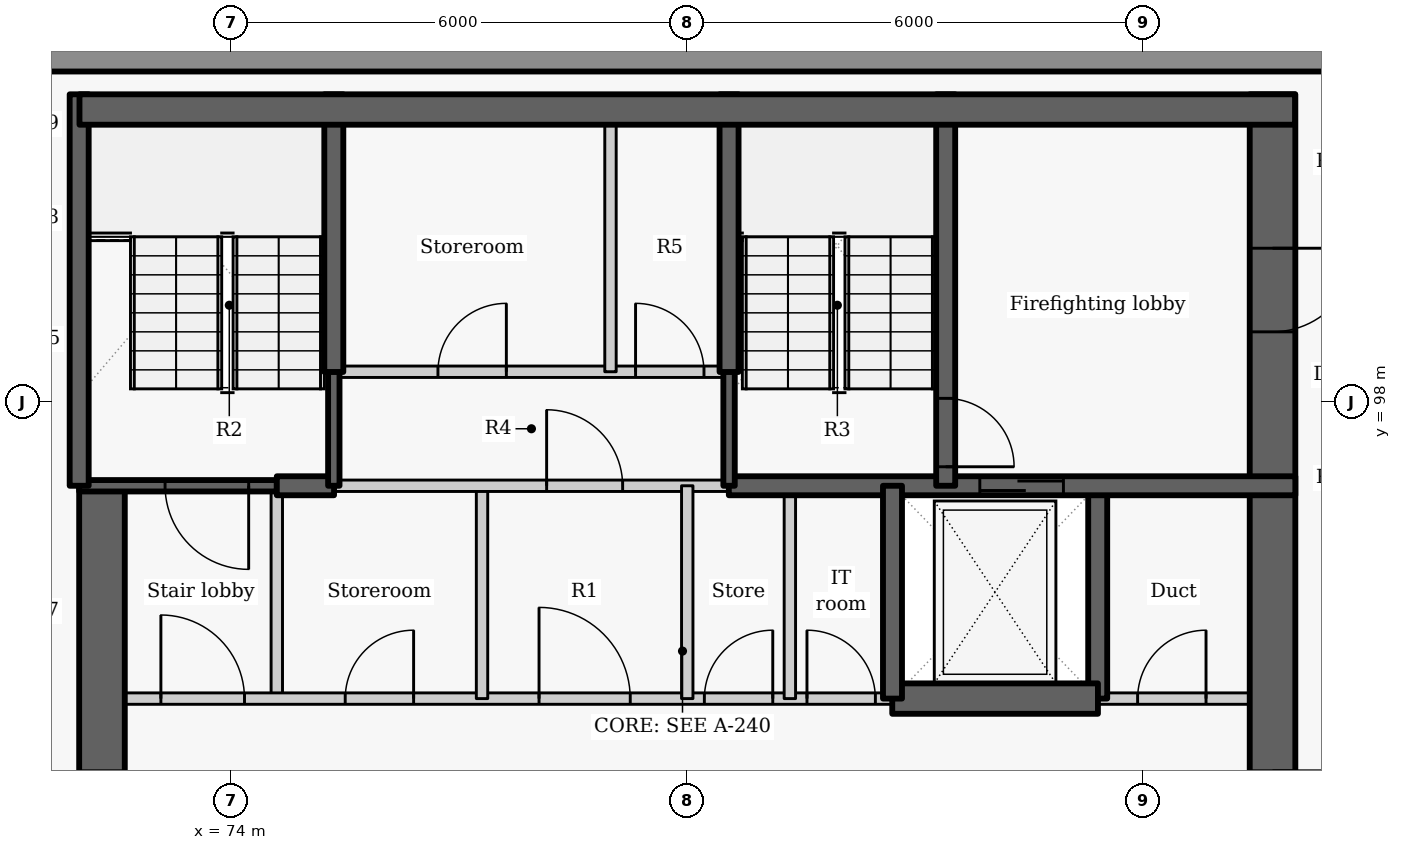
"""IFC4 building model, lengths in metres.
Left out: names, types, materials, properties, quantities, classifications, styles, units other than length and angle.
Written with IfcOpenShell. Run it as: python <this file> out.ifc"""

import sys

from ifc_helpers import new_model, si_unit, direction, frame, frame_2d, origin, place, context, subcontext, project, spatial, rectangle, extrude, element, fill, save


model = new_model("IFC4")
c1 = context("Model", 3, precision=1e-05, world=origin(), true_north=direction((0.0, 1.0)))
c2 = subcontext(c1, "Body", "Model", "MODEL_VIEW")
j1 = project(units=[si_unit("LENGTHUNIT", "METRE"), si_unit("PLANEANGLEUNIT", "RADIAN")], contexts=[c1])
p1 = place(None, origin())
s1 = spatial("IfcSite", under=j1, at=p1, CompositionType="ELEMENT")
p2 = place(p1, origin())
s2 = spatial("IfcBuilding", under=s1, at=p2, CompositionType="ELEMENT")
p3 = place(p2, frame((0.0, 0.0, 229.5)))
s3 = spatial("IfcBuildingStorey", under=s2, at=p3, CompositionType="ELEMENT", Elevation=229.5)
p4 = place(p3, frame((89.499, 102.5, 0.0), z_axis=(0.0, 0.0, 1.0), x_axis=(-1.0, 0.0, 0.0)))
e1 = element("IfcWall", 1, at=p4, inside=s3, PredefinedType="SOLIDWALL", context=c2, shape_type="SweptSolid", body=[
    extrude(rectangle(XDim=19.033, YDim=0.3, at=frame_2d((9.517, 0.0))), origin(), (0.0, 0.0, 1.0), 2.425),
])
p5 = place(p3, frame((74.6, 94.1, 0.0), z_axis=(0.0, 0.0, 1.0), x_axis=(0.0, 1.0, 0.0)))
e2 = element("IfcWall", 2, at=p5, inside=s3, PredefinedType="PARTITIONING", context=c2, shape_type="SweptSolid", body=[
    extrude(rectangle(XDim=2.8, YDim=0.15, at=frame_2d((1.4, 0.0))), origin(), (0.0, 0.0, 1.0), 3.025),
])
p6 = place(p3, frame((72.3, 87.8, -0.275), z_axis=(0.0, 0.0, 1.0), x_axis=(0.0, 1.0, 0.0)))
e3 = element("IfcWall", 3, at=p6, inside=s3, PredefinedType="SHEAR", context=c2, shape_type="SweptSolid", body=[
    extrude(rectangle(XDim=9.1, YDim=0.6, at=frame_2d((4.55, 0.0))), origin(), (0.0, 0.0, 1.0), 3.3),
])
p7 = place(p6, frame((3.85, 0.0, 0.275)))
e4 = element("IfcOpeningElement", 4, at=p7, cuts=e3, PredefinedType="OPENING", context=c2, shape_type="SweptSolid", body=[
    extrude(rectangle(XDim=1.5, YDim=2.1, at=frame_2d((0.75, 1.05))), frame((0.0, 0.31, 0.0), z_axis=(0.0, -1.0, 0.0), x_axis=(1.0, 0.0, 0.0)), (0.0, 0.0, 1.0), 0.62),
])
p8 = place(p3, frame((85.4, 94.1, -0.275), z_axis=(0.0, 0.0, 1.0), x_axis=(0.0, 1.0, 0.0)))
e5 = element("IfcWall", 5, at=p8, inside=s3, PredefinedType="SHEAR", context=c2, shape_type="SweptSolid", body=[
    extrude(rectangle(XDim=2.8, YDim=0.25, at=frame_2d((1.4, 0.0))), origin(), (0.0, 0.0, 1.0), 3.3),
])
p9 = place(p3, frame((87.7, 102.05, -0.275), z_axis=(0.0, 0.0, 1.0), x_axis=(0.0, -1.0, 0.0)))
e6 = element("IfcWall", 6, at=p9, inside=s3, PredefinedType="SHEAR", context=c2, shape_type="SweptSolid", body=[
    extrude(rectangle(XDim=14.25, YDim=0.6, at=frame_2d((7.125, 0.0))), origin(), (0.0, 0.0, 1.0), 3.3),
])
p10 = place(p9, frame((8.9, 0.0, 0.275)))
e7 = element("IfcOpeningElement", 7, at=p10, cuts=e6, PredefinedType="OPENING", context=c2, shape_type="SweptSolid", body=[
    extrude(rectangle(XDim=1.5, YDim=2.1, at=frame_2d((0.75, 1.05))), frame((0.0, 0.31, 0.0), z_axis=(0.0, -1.0, 0.0), x_axis=(1.0, 0.0, 0.0)), (0.0, 0.0, 1.0), 0.62),
])
p11 = place(p9, frame((2.025, 0.0, 0.275)))
e8 = element("IfcOpeningElement", 8, at=p11, cuts=e6, PredefinedType="OPENING", context=c2, shape_type="SweptSolid", body=[
    extrude(rectangle(XDim=1.1, YDim=2.1, at=frame_2d((0.55, 1.05))), frame((0.0, 0.31, 0.0), z_axis=(0.0, -1.0, 0.0), x_axis=(1.0, 0.0, 0.0)), (0.0, 0.0, 1.0), 0.62),
])
p12 = place(p3, frame((72.0, 94.1, 0.0), z_axis=(0.0, 0.0, 1.0), x_axis=(1.0, 0.0, 0.0)))
e9 = element("IfcWall", 9, at=p12, inside=s3, PredefinedType="PARTITIONING", context=c2, shape_type="SweptSolid", body=[
    extrude(rectangle(XDim=10.703, YDim=0.15, at=frame_2d((5.352, 0.0))), origin(), (0.0, 0.0, 1.0), 3.025),
])
p13 = place(p12, frame((1.075, 0.0, 0.0)))
e10 = element("IfcOpeningElement", 10, at=p13, cuts=e9, PredefinedType="OPENING", context=c2, shape_type="SweptSolid", body=[
    extrude(rectangle(XDim=1.1, YDim=2.1, at=frame_2d((0.55, 1.05))), frame((0.0, 0.085, 0.0), z_axis=(0.0, -1.0, 0.0), x_axis=(1.0, 0.0, 0.0)), (0.0, 0.0, 1.0), 0.17),
])
p14 = place(p12, frame((3.5, 0.0, 0.0)))
e11 = element("IfcOpeningElement", 11, at=p14, cuts=e9, PredefinedType="OPENING", context=c2, shape_type="SweptSolid", body=[
    extrude(rectangle(XDim=0.9, YDim=2.1, at=frame_2d((0.45, 1.05))), frame((0.0, 0.085, 0.0), z_axis=(0.0, -1.0, 0.0), x_axis=(1.0, 0.0, 0.0)), (0.0, 0.0, 1.0), 0.17),
])
p15 = place(p12, frame((6.05, 0.0, 0.0)))
e12 = element("IfcOpeningElement", 12, at=p15, cuts=e9, PredefinedType="OPENING", context=c2, shape_type="SweptSolid", body=[
    extrude(rectangle(XDim=1.2, YDim=2.1, at=frame_2d((0.6, 1.05))), frame((0.0, 0.085, 0.0), z_axis=(0.0, -1.0, 0.0), x_axis=(1.0, 0.0, 0.0)), (0.0, 0.0, 1.0), 0.17),
])
p16 = place(p12, frame((8.225, 0.0, 0.0)))
e13 = element("IfcOpeningElement", 13, at=p16, cuts=e9, PredefinedType="OPENING", context=c2, shape_type="SweptSolid", body=[
    extrude(rectangle(XDim=0.9, YDim=2.1, at=frame_2d((0.45, 1.05))), frame((0.0, 0.085, 0.0), z_axis=(0.0, -1.0, 0.0), x_axis=(1.0, 0.0, 0.0)), (0.0, 0.0, 1.0), 0.17),
])
p17 = place(p12, frame((9.575, 0.0, 0.0)))
e14 = element("IfcOpeningElement", 14, at=p17, cuts=e9, PredefinedType="OPENING", context=c2, shape_type="SweptSolid", body=[
    extrude(rectangle(XDim=0.9, YDim=2.1, at=frame_2d((0.45, 1.05))), frame((0.0, 0.085, 0.0), z_axis=(0.0, -1.0, 0.0), x_axis=(1.0, 0.0, 0.0)), (0.0, 0.0, 1.0), 0.17),
])
p18 = place(p3, frame((85.397, 94.1, 0.0), z_axis=(0.0, 0.0, 1.0), x_axis=(1.0, 0.0, 0.0)))
e15 = element("IfcWall", 15, at=p18, inside=s3, PredefinedType="PARTITIONING", context=c2, shape_type="SweptSolid", body=[
    extrude(rectangle(XDim=2.603, YDim=0.15, at=frame_2d((1.302, 0.0))), origin(), (0.0, 0.0, 1.0), 3.025),
])
p19 = place(p18, frame((0.528, 0.0, 0.0)))
e16 = element("IfcOpeningElement", 16, at=p19, cuts=e15, PredefinedType="OPENING", context=c2, shape_type="SweptSolid", body=[
    extrude(rectangle(XDim=0.9, YDim=2.1, at=frame_2d((0.45, 1.05))), frame((0.0, 0.085, 0.0), z_axis=(0.0, -1.0, 0.0), x_axis=(1.0, 0.0, 0.0)), (0.0, 0.0, 1.0), 0.17),
])
p20 = place(p3, frame((82.697, 94.1, -0.275), z_axis=(0.0, 0.0, 1.0), x_axis=(1.0, 0.0, 0.0)))
e17 = element("IfcWall", 17, at=p20, inside=s3, PredefinedType="SHEAR", context=c2, shape_type="SweptSolid", body=[
    extrude(rectangle(XDim=2.706, YDim=0.4, at=frame_2d((1.353, 0.0))), origin(), (0.0, 0.0, 1.0), 3.3),
])
p21 = place(p3, frame((74.6, 96.9, -0.275), z_axis=(0.0, 0.0, 1.0), x_axis=(-1.0, 0.0, 0.0)))
e18 = element("IfcWall", 18, at=p21, inside=s3, PredefinedType="SHEAR", context=c2, shape_type="SweptSolid", body=[
    extrude(rectangle(XDim=2.6, YDim=0.15, at=frame_2d((1.3, 0.0))), origin(), (0.0, 0.0, 1.0), 3.3),
])
p22 = place(p21, frame((0.37, 0.0, 0.275)))
e19 = element("IfcOpeningElement", 19, at=p22, cuts=e18, PredefinedType="OPENING", context=c2, shape_type="SweptSolid", body=[
    extrude(rectangle(XDim=1.1, YDim=2.1, at=frame_2d((0.55, 1.05))), frame((0.0, 0.085, 0.0), z_axis=(0.0, -1.0, 0.0), x_axis=(1.0, 0.0, 0.0)), (0.0, 0.0, 1.0), 0.17),
])
p23 = place(p3, frame((77.3, 94.1, 0.0), z_axis=(0.0, 0.0, 1.0), x_axis=(0.0, 1.0, 0.0)))
e20 = element("IfcWall", 20, at=p23, inside=s3, PredefinedType="PARTITIONING", context=c2, shape_type="SweptSolid", body=[
    extrude(rectangle(XDim=2.8, YDim=0.15, at=frame_2d((1.4, 0.0))), origin(), (0.0, 0.0, 1.0), 3.025),
])
p24 = place(p3, frame((74.6, 96.9, -0.275), z_axis=(0.0, 0.0, 1.0), x_axis=(1.0, 0.0, 0.0)))
e21 = element("IfcWall", 21, at=p24, inside=s3, PredefinedType="SHEAR", context=c2, shape_type="SweptSolid", body=[
    extrude(rectangle(XDim=0.753, YDim=0.25, at=frame_2d((0.376, 0.0))), origin(), (0.0, 0.0, 1.0), 3.3),
])
p25 = place(p3, frame((80.547, 96.9, -0.275), z_axis=(0.0, 0.0, 1.0), x_axis=(1.0, 0.0, 0.0)))
e22 = element("IfcWall", 22, at=p25, inside=s3, PredefinedType="SHEAR", context=c2, shape_type="SweptSolid", body=[
    extrude(rectangle(XDim=7.453, YDim=0.25, at=frame_2d((3.727, 0.0))), origin(), (0.0, 0.0, 1.0), 3.3),
])
p26 = place(p25, frame((3.302, 0.0, 0.275)))
e23 = element("IfcOpeningElement", 23, at=p26, cuts=e22, PredefinedType="OPENING", context=c2, shape_type="SweptSolid", body=[
    extrude(rectangle(XDim=1.1, YDim=2.1, at=frame_2d((0.55, 1.05))), frame((0.0, 0.135, 0.0), z_axis=(0.0, -1.0, 0.0), x_axis=(1.0, 0.0, 0.0)), (0.0, 0.0, 1.0), 0.27),
])
p27 = place(p3, frame((75.347, 96.9, 0.0), z_axis=(0.0, 0.0, 1.0), x_axis=(1.0, 0.0, 0.0)))
e24 = element("IfcWall", 24, at=p27, inside=s3, PredefinedType="PARTITIONING", context=c2, shape_type="SweptSolid", body=[
    extrude(rectangle(XDim=5.206, YDim=0.15, at=frame_2d((2.603, 0.0))), origin(), (0.0, 0.0, 1.0), 3.025),
])
p28 = place(p27, frame((2.803, 0.0, 0.0)))
e25 = element("IfcOpeningElement", 25, at=p28, cuts=e24, PredefinedType="OPENING", context=c2, shape_type="SweptSolid", body=[
    extrude(rectangle(XDim=1.0, YDim=2.1, at=frame_2d((0.5, 1.05))), frame((0.0, 0.085, 0.0), z_axis=(0.0, -1.0, 0.0), x_axis=(1.0, 0.0, 0.0)), (0.0, 0.0, 1.0), 0.17),
])
for number, where, z_axis, x_axis in (
    (26, (80.0, 94.1, 0.0), (0.0, 0.0, 1.0), (0.0, 1.0, 0.0)),
    (27, (81.35, 94.1, 0.0), (0.0, 0.0, 1.0), (0.0, 1.0, 0.0)),
):
    element("IfcWall", number, at=place(p3, frame(where, z_axis=z_axis, x_axis=x_axis)), inside=s3, PredefinedType="PARTITIONING", context=c2, shape_type="SweptSolid", body=[
        extrude(rectangle(XDim=2.8, YDim=0.15, at=frame_2d((1.4, 0.0))), origin(), (0.0, 0.0, 1.0), 3.025),
    ])
p29 = place(p3, frame((82.7, 94.1, -0.275), z_axis=(0.0, 0.0, 1.0), x_axis=(0.0, 1.0, 0.0)))
e28 = element("IfcWall", 28, at=p29, inside=s3, PredefinedType="SHEAR", context=c2, shape_type="SweptSolid", body=[
    extrude(rectangle(XDim=2.8, YDim=0.25, at=frame_2d((1.4, 0.0))), origin(), (0.0, 0.0, 1.0), 3.3),
])
p30 = place(p3, frame((75.35, 96.9, -0.275), z_axis=(0.0, 0.0, 1.0), x_axis=(0.0, 1.0, 0.0)))
e29 = element("IfcWall", 29, at=p30, inside=s3, PredefinedType="SHEAR", context=c2, shape_type="SweptSolid", body=[
    extrude(rectangle(XDim=1.503, YDim=0.15, at=frame_2d((0.751, 0.0))), origin(), (0.0, 0.0, 1.0), 3.3),
])
p31 = place(p3, frame((75.35, 98.397, -0.275), z_axis=(0.0, 0.0, 1.0), x_axis=(0.0, 1.0, 0.0)))
e30 = element("IfcWall", 30, at=p31, inside=s3, PredefinedType="SHEAR", context=c2, shape_type="SweptSolid", body=[
    extrude(rectangle(XDim=3.653, YDim=0.25, at=frame_2d((1.827, 0.0))), origin(), (0.0, 0.0, 1.0), 3.3),
])
p32 = place(p3, frame((72.0, 96.9, -0.275), z_axis=(0.0, 0.0, 1.0), x_axis=(0.0, 1.0, 0.0)))
e31 = element("IfcWall", 31, at=p32, inside=s3, PredefinedType="SHEAR", context=c2, shape_type="SweptSolid", body=[
    extrude(rectangle(XDim=5.15, YDim=0.25, at=frame_2d((2.575, 0.0))), origin(), (0.0, 0.0, 1.0), 3.3),
])
p33 = place(p3, frame((83.4, 102.05, -0.275), z_axis=(0.0, 0.0, 1.0), x_axis=(0.0, -1.0, 0.0)))
e32 = element("IfcWall", 32, at=p33, inside=s3, PredefinedType="SHEAR", context=c2, shape_type="SweptSolid", body=[
    extrude(rectangle(XDim=5.15, YDim=0.25, at=frame_2d((2.575, 0.0))), origin(), (0.0, 0.0, 1.0), 3.3),
])
p34 = place(p33, frame((4.0, 0.0, 0.275)))
e33 = element("IfcOpeningElement", 33, at=p34, cuts=e32, PredefinedType="OPENING", context=c2, shape_type="SweptSolid", body=[
    extrude(rectangle(XDim=0.9, YDim=2.1, at=frame_2d((0.45, 1.05))), frame((0.0, 0.135, 0.0), z_axis=(0.0, -1.0, 0.0), x_axis=(1.0, 0.0, 0.0)), (0.0, 0.0, 1.0), 0.27),
])
p35 = place(p3, frame((80.55, 96.9, -0.275), z_axis=(0.0, 0.0, 1.0), x_axis=(0.0, 1.0, 0.0)))
e34 = element("IfcWall", 34, at=p35, inside=s3, PredefinedType="SHEAR", context=c2, shape_type="SweptSolid", body=[
    extrude(rectangle(XDim=1.503, YDim=0.15, at=frame_2d((0.751, 0.0))), origin(), (0.0, 0.0, 1.0), 3.3),
])
p36 = place(p3, frame((80.55, 98.397, -0.275), z_axis=(0.0, 0.0, 1.0), x_axis=(0.0, 1.0, 0.0)))
e35 = element("IfcWall", 35, at=p36, inside=s3, PredefinedType="SHEAR", context=c2, shape_type="SweptSolid", body=[
    extrude(rectangle(XDim=3.653, YDim=0.25, at=frame_2d((1.827, 0.0))), origin(), (0.0, 0.0, 1.0), 3.3),
])
p37 = place(p3, frame((75.35, 98.4, 0.0), z_axis=(0.0, 0.0, 1.0), x_axis=(1.0, 0.0, 0.0)))
e36 = element("IfcWall", 36, at=p37, inside=s3, PredefinedType="PARTITIONING", context=c2, shape_type="SweptSolid", body=[
    extrude(rectangle(XDim=5.2, YDim=0.15, at=frame_2d((2.6, 0.0))), origin(), (0.0, 0.0, 1.0), 3.025),
])
p38 = place(p37, frame((1.37, 0.0, 0.0)))
e37 = element("IfcOpeningElement", 37, at=p38, cuts=e36, PredefinedType="OPENING", context=c2, shape_type="SweptSolid", body=[
    extrude(rectangle(XDim=0.9, YDim=2.1, at=frame_2d((0.45, 1.05))), frame((0.0, 0.085, 0.0), z_axis=(0.0, -1.0, 0.0), x_axis=(1.0, 0.0, 0.0)), (0.0, 0.0, 1.0), 0.17),
])
p39 = place(p37, frame((3.97, 0.0, 0.0)))
e38 = element("IfcOpeningElement", 38, at=p39, cuts=e36, PredefinedType="OPENING", context=c2, shape_type="SweptSolid", body=[
    extrude(rectangle(XDim=0.9, YDim=2.1, at=frame_2d((0.45, 1.05))), frame((0.0, 0.085, 0.0), z_axis=(0.0, -1.0, 0.0), x_axis=(1.0, 0.0, 0.0)), (0.0, 0.0, 1.0), 0.17),
])
p40 = place(p3, frame((78.99, 98.4, 0.0), z_axis=(0.0, 0.0, 1.0), x_axis=(0.0, 1.0, 0.0)))
e39 = element("IfcWall", 39, at=p40, inside=s3, PredefinedType="PARTITIONING", context=c2, shape_type="SweptSolid", body=[
    extrude(rectangle(XDim=3.65, YDim=0.15, at=frame_2d((1.825, 0.0))), origin(), (0.0, 0.0, 1.0), 3.025),
])
p41 = place(p3, frame((72.004, 101.85, -0.275), z_axis=(0.0, 0.0, 1.0), x_axis=(1.0, 0.0, 0.0)))
e40 = element("IfcWall", 40, at=p41, inside=s3, PredefinedType="SHEAR", context=c2, shape_type="SweptSolid", body=[
    extrude(rectangle(XDim=15.992, YDim=0.4, at=frame_2d((7.996, 0.0))), origin(), (0.0, 0.0, 1.0), 3.3),
])
p42 = place(p13, origin())
e41 = element("IfcDoor", 41, at=p42, inside=s3, OperationType="SINGLE_SWING_LEFT", PredefinedType="DOOR", context=c2, shape_type="SweptSolid", body=[
    extrude(rectangle(XDim=1.1, YDim=2.1, at=frame_2d((0.55, 1.05))), frame((0.0, 0.025, 0.0), z_axis=(0.0, -1.0, 0.0), x_axis=(1.0, 0.0, 0.0)), (0.0, 0.0, 1.0), 0.05),
])
fill(e10, e41)
p43 = place(p14, origin())
e42 = element("IfcDoor", 42, at=p43, inside=s3, OperationType="SINGLE_SWING_RIGHT", PredefinedType="DOOR", context=c2, shape_type="SweptSolid", body=[
    extrude(rectangle(XDim=0.9, YDim=2.1, at=frame_2d((0.45, 1.05))), frame((0.0, 0.025, 0.0), z_axis=(0.0, -1.0, 0.0), x_axis=(1.0, 0.0, 0.0)), (0.0, 0.0, 1.0), 0.05),
])
fill(e11, e42)
p44 = place(p15, origin())
e43 = element("IfcDoor", 43, at=p44, inside=s3, OperationType="DOUBLE_DOOR_SINGLE_SWING", PredefinedType="DOOR", context=c2, shape_type="SweptSolid", body=[
    extrude(rectangle(XDim=1.2, YDim=2.1, at=frame_2d((0.6, 1.05))), frame((0.0, 0.025, 0.0), z_axis=(0.0, -1.0, 0.0), x_axis=(1.0, 0.0, 0.0)), (0.0, 0.0, 1.0), 0.05),
])
fill(e12, e43)
p45 = place(p16, origin())
e44 = element("IfcDoor", 44, at=p45, inside=s3, OperationType="SINGLE_SWING_RIGHT", PredefinedType="DOOR", context=c2, shape_type="SweptSolid", body=[
    extrude(rectangle(XDim=0.9, YDim=2.1, at=frame_2d((0.45, 1.05))), frame((0.0, 0.025, 0.0), z_axis=(0.0, -1.0, 0.0), x_axis=(1.0, 0.0, 0.0)), (0.0, 0.0, 1.0), 0.05),
])
fill(e13, e44)
p46 = place(p17, origin())
e45 = element("IfcDoor", 45, at=p46, inside=s3, OperationType="SINGLE_SWING_LEFT", PredefinedType="DOOR", context=c2, shape_type="SweptSolid", body=[
    extrude(rectangle(XDim=0.9, YDim=2.1, at=frame_2d((0.45, 1.05))), frame((0.0, 0.025, 0.0), z_axis=(0.0, -1.0, 0.0), x_axis=(1.0, 0.0, 0.0)), (0.0, 0.0, 1.0), 0.05),
])
fill(e14, e45)
p47 = place(p26, origin())
e46 = element("IfcDoor", 46, at=p47, inside=s3, OperationType="SLIDING_TO_LEFT", PredefinedType="DOOR", context=c2, shape_type="SweptSolid", body=[
    extrude(rectangle(XDim=1.1, YDim=2.1, at=frame_2d((0.55, 1.05))), frame((0.0, 0.025, 0.0), z_axis=(0.0, -1.0, 0.0), x_axis=(1.0, 0.0, 0.0)), (0.0, 0.0, 1.0), 0.05),
])
fill(e23, e46)
p48 = place(p19, origin())
e47 = element("IfcDoor", 47, at=p48, inside=s3, OperationType="SINGLE_SWING_RIGHT", PredefinedType="DOOR", context=c2, shape_type="SweptSolid", body=[
    extrude(rectangle(XDim=0.9, YDim=2.1, at=frame_2d((0.45, 1.05))), frame((0.0, 0.025, 0.0), z_axis=(0.0, -1.0, 0.0), x_axis=(1.0, 0.0, 0.0)), (0.0, 0.0, 1.0), 0.05),
])
fill(e16, e47)
p49 = place(p28, origin())
e48 = element("IfcDoor", 48, at=p49, inside=s3, OperationType="SINGLE_SWING_LEFT", PredefinedType="DOOR", context=c2, shape_type="SweptSolid", body=[
    extrude(rectangle(XDim=1.0, YDim=2.1, at=frame_2d((0.5, 1.05))), frame((0.0, 0.025, 0.0), z_axis=(0.0, -1.0, 0.0), x_axis=(1.0, 0.0, 0.0)), (0.0, 0.0, 1.0), 0.05),
])
fill(e25, e48)
p50 = place(p38, origin())
e49 = element("IfcDoor", 49, at=p50, inside=s3, OperationType="SINGLE_SWING_RIGHT", PredefinedType="DOOR", context=c2, shape_type="SweptSolid", body=[
    extrude(rectangle(XDim=0.9, YDim=2.1, at=frame_2d((0.45, 1.05))), frame((0.0, 0.025, 0.0), z_axis=(0.0, -1.0, 0.0), x_axis=(1.0, 0.0, 0.0)), (0.0, 0.0, 1.0), 0.05),
])
fill(e37, e49)
p51 = place(p39, origin())
e50 = element("IfcDoor", 50, at=p51, inside=s3, OperationType="SINGLE_SWING_LEFT", PredefinedType="DOOR", context=c2, shape_type="SweptSolid", body=[
    extrude(rectangle(XDim=0.9, YDim=2.1, at=frame_2d((0.45, 1.05))), frame((0.0, 0.025, 0.0), z_axis=(0.0, -1.0, 0.0), x_axis=(1.0, 0.0, 0.0)), (0.0, 0.0, 1.0), 0.05),
])
fill(e38, e50)
p52 = place(p22, origin())
e51 = element("IfcDoor", 51, at=p52, inside=s3, OperationType="SINGLE_SWING_LEFT", PredefinedType="DOOR", context=c2, shape_type="SweptSolid", body=[
    extrude(rectangle(XDim=1.1, YDim=2.1, at=frame_2d((0.55, 1.05))), frame((0.0, 0.025, 0.0), z_axis=(0.0, -1.0, 0.0), x_axis=(1.0, 0.0, 0.0)), (0.0, 0.0, 1.0), 0.05),
])
fill(e19, e51)
p53 = place(p34, origin())
e52 = element("IfcDoor", 52, at=p53, inside=s3, OperationType="SINGLE_SWING_RIGHT", PredefinedType="DOOR", context=c2, shape_type="SweptSolid", body=[
    extrude(rectangle(XDim=0.9, YDim=2.1, at=frame_2d((0.45, 1.05))), frame((0.0, 0.025, 0.0), z_axis=(0.0, -1.0, 0.0), x_axis=(1.0, 0.0, 0.0)), (0.0, 0.0, 1.0), 0.05),
])
fill(e33, e52)
p54 = place(p10, origin())
e53 = element("IfcDoor", 53, at=p54, inside=s3, OperationType="DOUBLE_DOOR_SINGLE_SWING", PredefinedType="DOOR", context=c2, shape_type="SweptSolid", body=[
    extrude(rectangle(XDim=1.5, YDim=2.1, at=frame_2d((0.75, 1.05))), frame((0.0, 0.025, 0.0), z_axis=(0.0, -1.0, 0.0), x_axis=(1.0, 0.0, 0.0)), (0.0, 0.0, 1.0), 0.05),
])
fill(e7, e53)
p55 = place(p7, origin())
e54 = element("IfcDoor", 54, at=p55, inside=s3, OperationType="DOUBLE_DOOR_SINGLE_SWING", PredefinedType="DOOR", context=c2, shape_type="SweptSolid", body=[
    extrude(rectangle(XDim=1.5, YDim=2.1, at=frame_2d((0.75, 1.05))), frame((0.0, 0.025, 0.0), z_axis=(0.0, -1.0, 0.0), x_axis=(1.0, 0.0, 0.0)), (0.0, 0.0, 1.0), 0.05),
])
fill(e4, e54)
p56 = place(p11, origin())
e55 = element("IfcDoor", 55, at=p56, inside=s3, OperationType="SINGLE_SWING_LEFT", PredefinedType="DOOR", context=c2, shape_type="SweptSolid", body=[
    extrude(rectangle(XDim=1.1, YDim=2.1, at=frame_2d((0.55, 1.05))), frame((0.0, 0.025, 0.0), z_axis=(0.0, -1.0, 0.0), x_axis=(1.0, 0.0, 0.0)), (0.0, 0.0, 1.0), 0.05),
])
fill(e8, e55)
save(model, sys.argv[1])
